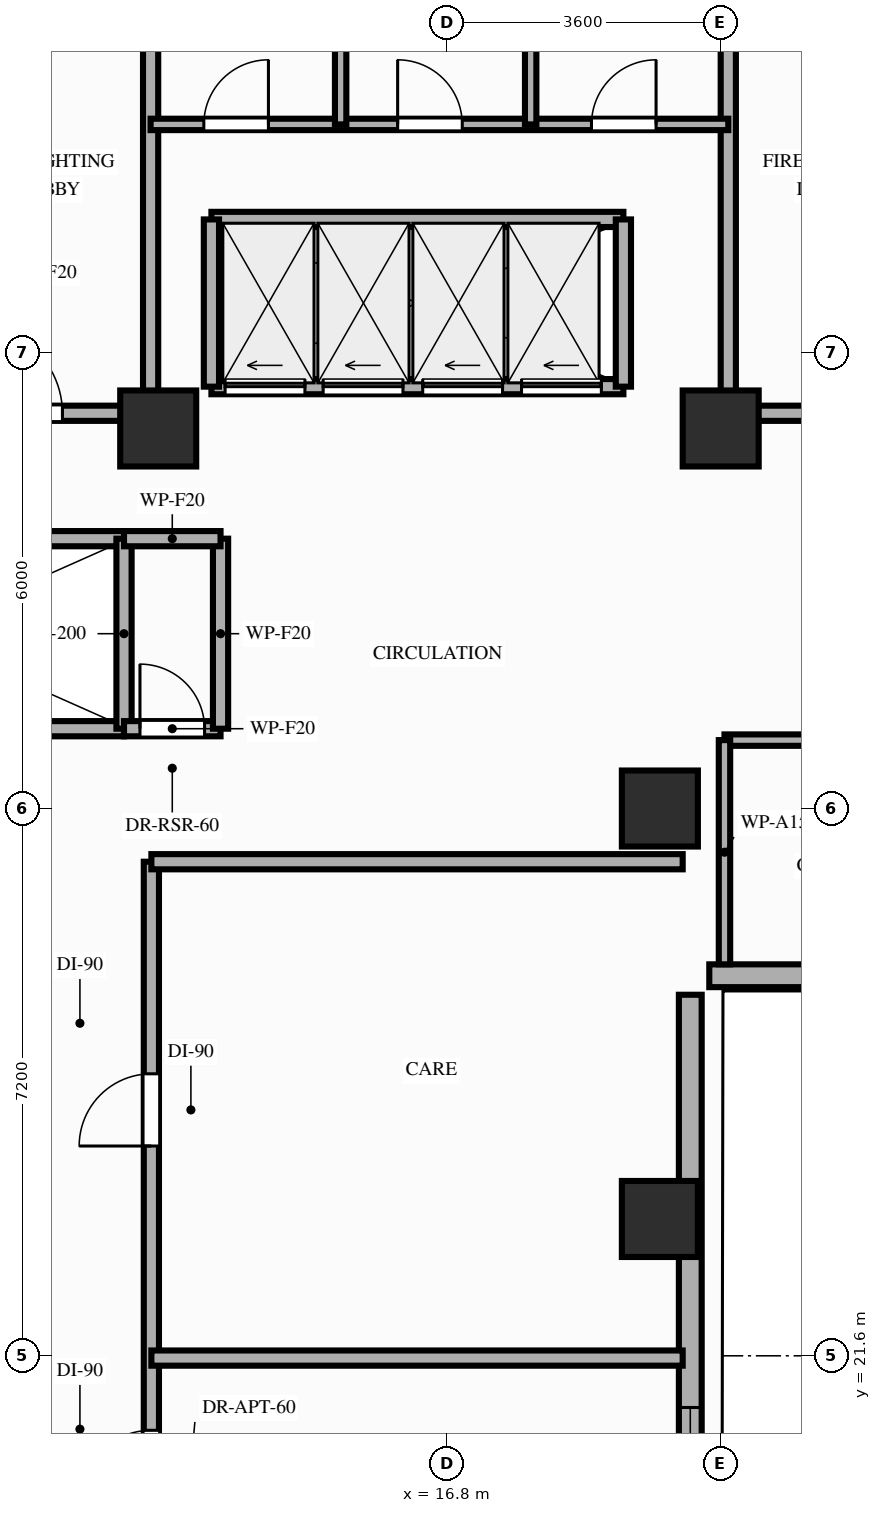
"""IFC4 building model, lengths in metres.
Left out: names, types, materials, properties, quantities, classifications, styles, units other than length and angle.
Written with IfcOpenShell. Run it as: python <this file> out.ifc"""

import sys

from ifc_helpers import new_model, si_unit, direction, frame, frame_2d, origin, origin_2d, place, context, subcontext, project, spatial, rectangle, extrude, element, fill, save


model = new_model("IFC4")
c1 = context("Model", 3, precision=1e-05, world=origin(), true_north=direction((0.0, 1.0)))
c2 = subcontext(c1, "Body", "Model", "MODEL_VIEW")
j1 = project(units=[si_unit("LENGTHUNIT", "METRE"), si_unit("PLANEANGLEUNIT", "RADIAN")], contexts=[c1])
p1 = place(None, origin())
s1 = spatial("IfcSite", under=j1, at=p1, CompositionType="ELEMENT")
p2 = place(p1, origin())
s2 = spatial("IfcBuilding", under=s1, at=p2, CompositionType="ELEMENT")
p3 = place(p2, frame((0.0, 0.0, 133.0)))
s3 = spatial("IfcBuildingStorey", under=s2, at=p3, CompositionType="ELEMENT", Elevation=133.0)
for number, where, z_axis, x_axis in (
    (1, (13.0, 33.8, 0.0), (0.0, 0.0, 1.0), (1.0, 0.0, 0.0)),
    (2, (20.4, 33.8, 0.0), (0.0, 0.0, 1.0), (1.0, 0.0, 0.0)),
    (3, (19.6, 23.4, 0.0), (0.0, 0.0, 1.0), (1.0, 0.0, 0.0)),
    (4, (19.6, 28.8, 0.0), (0.0, 0.0, 1.0), (1.0, 0.0, 0.0)),
):
    element("IfcColumn", number, at=place(p3, frame(where, z_axis=z_axis, x_axis=x_axis)), inside=s3, PredefinedType="COLUMN", context=c2, shape_type="SweptSolid", body=[
        extrude(rectangle(XDim=1.0, YDim=1.0, at=origin_2d()), origin(), (0.0, 0.0, 1.0), 3.2),
    ])
p4 = place(p3, frame((20.0, 8.8, 0.0), z_axis=(0.0, 0.0, 1.0), x_axis=(0.0, 1.0, 0.0)))
e5 = element("IfcWall", 5, at=p4, inside=s3, PredefinedType="STANDARD", context=c2, shape_type="SweptSolid", body=[
    extrude(rectangle(XDim=17.55, YDim=0.3, at=frame_2d((8.775, 0.0))), origin(), (0.0, 0.0, 1.0), 2.46),
])
p5 = place(p4, frame((10.32, 0.0, 0.85)))
e6 = element("IfcOpeningElement", 6, at=p5, cuts=e5, PredefinedType="OPENING", context=c2, shape_type="SweptSolid", body=[
    extrude(rectangle(XDim=1.8, YDim=1.36, at=frame_2d((0.9, 0.68))), frame((0.0, 0.16, 0.0), z_axis=(0.0, -1.0, 0.0), x_axis=(1.0, 0.0, 0.0)), (0.0, 0.0, 1.0), 0.32),
])
p6 = place(p3, frame((20.25, 26.6, 0.0), z_axis=(0.0, 0.0, 1.0), x_axis=(1.0, 0.0, 0.0)))
e7 = element("IfcWall", 7, at=p6, inside=s3, PredefinedType="STANDARD", context=c2, shape_type="SweptSolid", body=[
    extrude(rectangle(XDim=26.15, YDim=0.3, at=frame_2d((13.075, 0.0))), origin(), (0.0, 0.0, 1.0), 2.71),
])
p7 = place(p6, frame((7.95, 0.0, 0.0)))
e8 = element("IfcOpeningElement", 8, at=p7, cuts=e7, PredefinedType="OPENING", context=c2, shape_type="SweptSolid", body=[
    extrude(rectangle(XDim=1.4, YDim=2.1, at=frame_2d((0.7, 1.05))), frame((0.0, 0.16, 0.0), z_axis=(0.0, -1.0, 0.0), x_axis=(1.0, 0.0, 0.0)), (0.0, 0.0, 1.0), 0.32),
])
p8 = place(p6, frame((22.45, 0.0, 0.0)))
e9 = element("IfcOpeningElement", 9, at=p8, cuts=e7, PredefinedType="OPENING", context=c2, shape_type="SweptSolid", body=[
    extrude(rectangle(XDim=1.4, YDim=2.1, at=frame_2d((0.7, 1.05))), frame((0.0, 0.16, 0.0), z_axis=(0.0, -1.0, 0.0), x_axis=(1.0, 0.0, 0.0)), (0.0, 0.0, 1.0), 0.32),
])
p9 = place(p6, frame((2.65, 0.0, 0.85)))
e10 = element("IfcOpeningElement", 10, at=p9, cuts=e7, PredefinedType="OPENING", context=c2, shape_type="SweptSolid", body=[
    extrude(rectangle(XDim=1.8, YDim=1.61, at=frame_2d((0.9, 0.805))), frame((0.0, 0.16, 0.0), z_axis=(0.0, -1.0, 0.0), x_axis=(1.0, 0.0, 0.0)), (0.0, 0.0, 1.0), 0.32),
])
p10 = place(p6, frame((13.65, 0.0, 0.85)))
e11 = element("IfcOpeningElement", 11, at=p10, cuts=e7, PredefinedType="OPENING", context=c2, shape_type="SweptSolid", body=[
    extrude(rectangle(XDim=1.8, YDim=1.61, at=frame_2d((0.9, 0.805))), frame((0.0, 0.16, 0.0), z_axis=(0.0, -1.0, 0.0), x_axis=(1.0, 0.0, 0.0)), (0.0, 0.0, 1.0), 0.32),
])
for number, where, z_axis, x_axis in (
    (12, (7.0, 29.85, 0.0), (0.0, 0.0, 1.0), (1.0, 0.0, 0.0)),
    (13, (7.0, 32.35, 0.0), (0.0, 0.0, 1.0), (1.0, 0.0, 0.0)),
):
    element("IfcWall", number, at=place(p3, frame(where, z_axis=z_axis, x_axis=x_axis)), inside=s3, PredefinedType="MOVABLE", context=c2, shape_type="SweptSolid", body=[
        extrude(rectangle(XDim=5.55, YDim=0.2, at=frame_2d((2.775, 0.0))), origin(), (0.0, 0.0, 1.0), 3.02),
    ])
p11 = place(p3, frame((12.55, 29.85, 0.0), z_axis=(0.0, 0.0, 1.0), x_axis=(0.0, 1.0, 0.0)))
e14 = element("IfcWall", 14, at=p11, inside=s3, PredefinedType="MOVABLE", context=c2, shape_type="SweptSolid", body=[
    extrude(rectangle(XDim=2.5, YDim=0.2, at=frame_2d((1.25, 0.0))), origin(), (0.0, 0.0, 1.0), 3.02),
])
p12 = place(p3, frame((12.9, 34.0, 0.0), z_axis=(0.0, 0.0, 1.0), x_axis=(0.0, 1.0, 0.0)))
e15 = element("IfcWall", 15, at=p12, inside=s3, PredefinedType="PARTITIONING", context=c2, shape_type="SweptSolid", body=[
    extrude(rectangle(XDim=5.45, YDim=0.2, at=frame_2d((2.725, 0.0))), origin(), (0.0, 0.0, 1.0), 2.46),
])
p13 = place(p3, frame((10.24, 34.0, 0.0), z_axis=(0.0, 0.0, 1.0), x_axis=(1.0, 0.0, 0.0)))
e16 = element("IfcWall", 16, at=p13, inside=s3, PredefinedType="PARTITIONING", context=c2, shape_type="SweptSolid", body=[
    extrude(rectangle(XDim=2.66, YDim=0.2, at=frame_2d((1.33, 0.0))), origin(), (0.0, 0.0, 1.0), 2.46),
])
p14 = place(p13, frame((0.35, 0.0, 0.0)))
e17 = element("IfcOpeningElement", 17, at=p14, cuts=e16, PredefinedType="OPENING", context=c2, shape_type="SweptSolid", body=[
    extrude(rectangle(XDim=1.15, YDim=2.15, at=frame_2d((0.575, 1.075))), frame((0.0, 0.11, 0.0), z_axis=(0.0, -1.0, 0.0), x_axis=(1.0, 0.0, 0.0)), (0.0, 0.0, 1.0), 0.22),
])
p15 = place(p3, frame((20.5, 34.0, 0.0), z_axis=(0.0, 0.0, 1.0), x_axis=(0.0, 1.0, 0.0)))
e18 = element("IfcWall", 18, at=p15, inside=s3, PredefinedType="PARTITIONING", context=c2, shape_type="SweptSolid", body=[
    extrude(rectangle(XDim=5.45, YDim=0.2, at=frame_2d((2.725, 0.0))), origin(), (0.0, 0.0, 1.0), 2.46),
])
p16 = place(p3, frame((20.5, 34.0, 0.0), z_axis=(0.0, 0.0, 1.0), x_axis=(1.0, 0.0, 0.0)))
e19 = element("IfcWall", 19, at=p16, inside=s3, PredefinedType="PARTITIONING", context=c2, shape_type="SweptSolid", body=[
    extrude(rectangle(XDim=2.6, YDim=0.2, at=frame_2d((1.3, 0.0))), origin(), (0.0, 0.0, 1.0), 2.46),
])
p17 = place(p16, frame((1.05, 0.0, 0.0)))
e20 = element("IfcOpeningElement", 20, at=p17, cuts=e19, PredefinedType="OPENING", context=c2, shape_type="SweptSolid", body=[
    extrude(rectangle(XDim=1.15, YDim=2.15, at=frame_2d((0.575, 1.075))), frame((0.0, 0.11, 0.0), z_axis=(0.0, -1.0, 0.0), x_axis=(1.0, 0.0, 0.0)), (0.0, 0.0, 1.0), 0.22),
])
p18 = place(p3, frame((12.55, 29.85, 0.0), z_axis=(0.0, 0.0, 1.0), x_axis=(1.0, 0.0, 0.0)))
e21 = element("IfcWall", 21, at=p18, inside=s3, PredefinedType="PARTITIONING", context=c2, shape_type="SweptSolid", body=[
    extrude(rectangle(XDim=1.27, YDim=0.2, at=frame_2d((0.635, 0.0))), origin(), (0.0, 0.0, 1.0), 3.02),
])
p19 = place(p18, frame((0.21, 0.0, 0.0)))
e22 = element("IfcOpeningElement", 22, at=p19, cuts=e21, PredefinedType="OPENING", context=c2, shape_type="SweptSolid", body=[
    extrude(rectangle(XDim=0.85, YDim=2.05, at=frame_2d((0.425, 1.025))), frame((0.0, 0.11, 0.0), z_axis=(0.0, -1.0, 0.0), x_axis=(1.0, 0.0, 0.0)), (0.0, 0.0, 1.0), 0.22),
])
p20 = place(p3, frame((13.82, 29.85, 0.0), z_axis=(0.0, 0.0, 1.0), x_axis=(0.0, 1.0, 0.0)))
e23 = element("IfcWall", 23, at=p20, inside=s3, PredefinedType="PARTITIONING", context=c2, shape_type="SweptSolid", body=[
    extrude(rectangle(XDim=2.5, YDim=0.2, at=frame_2d((1.25, 0.0))), origin(), (0.0, 0.0, 1.0), 3.02),
])
p21 = place(p3, frame((12.55, 32.35, 0.0), z_axis=(0.0, 0.0, 1.0), x_axis=(1.0, 0.0, 0.0)))
e24 = element("IfcWall", 24, at=p21, inside=s3, PredefinedType="PARTITIONING", context=c2, shape_type="SweptSolid", body=[
    extrude(rectangle(XDim=1.27, YDim=0.2, at=frame_2d((0.635, 0.0))), origin(), (0.0, 0.0, 1.0), 3.02),
])
p22 = place(p3, frame((12.9, 37.8, 0.0), z_axis=(0.0, 0.0, 1.0), x_axis=(1.0, 0.0, 0.0)))
e25 = element("IfcWall", 25, at=p22, inside=s3, PredefinedType="PARTITIONING", context=c2, shape_type="SweptSolid", body=[
    extrude(rectangle(XDim=7.6, YDim=0.15, at=frame_2d((3.8, 0.0))), origin(), (0.0, 0.0, 1.0), 3.02),
])
p23 = place(p22, frame((0.7, 0.0, 0.0)))
e26 = element("IfcOpeningElement", 26, at=p23, cuts=e25, PredefinedType="OPENING", context=c2, shape_type="SweptSolid", body=[
    extrude(rectangle(XDim=0.85, YDim=2.05, at=frame_2d((0.425, 1.025))), frame((0.0, 0.085, 0.0), z_axis=(0.0, -1.0, 0.0), x_axis=(1.0, 0.0, 0.0)), (0.0, 0.0, 1.0), 0.17),
])
p24 = place(p22, frame((3.25, 0.0, 0.0)))
e27 = element("IfcOpeningElement", 27, at=p24, cuts=e25, PredefinedType="OPENING", context=c2, shape_type="SweptSolid", body=[
    extrude(rectangle(XDim=0.85, YDim=2.05, at=frame_2d((0.425, 1.025))), frame((0.0, 0.085, 0.0), z_axis=(0.0, -1.0, 0.0), x_axis=(1.0, 0.0, 0.0)), (0.0, 0.0, 1.0), 0.17),
])
p25 = place(p22, frame((5.8, 0.0, 0.0)))
e28 = element("IfcOpeningElement", 28, at=p25, cuts=e25, PredefinedType="OPENING", context=c2, shape_type="SweptSolid", body=[
    extrude(rectangle(XDim=0.85, YDim=2.05, at=frame_2d((0.425, 1.025))), frame((0.0, 0.085, 0.0), z_axis=(0.0, -1.0, 0.0), x_axis=(1.0, 0.0, 0.0)), (0.0, 0.0, 1.0), 0.17),
])
for number, where, z_axis, x_axis in (
    (29, (15.4, 37.8, 0.0), (0.0, 0.0, 1.0), (0.0, 1.0, 0.0)),
    (30, (17.9, 37.8, 0.0), (0.0, 0.0, 1.0), (0.0, 1.0, 0.0)),
):
    element("IfcWall", number, at=place(p3, frame(where, z_axis=z_axis, x_axis=x_axis)), inside=s3, PredefinedType="PARTITIONING", context=c2, shape_type="SweptSolid", body=[
        extrude(rectangle(XDim=4.4, YDim=0.15, at=frame_2d((2.2, 0.0))), origin(), (0.0, 0.0, 1.0), 2.46),
    ])
p26 = place(p3, frame((13.7, 34.35, 0.0), z_axis=(0.0, 0.0, 1.0), x_axis=(1.0, 0.0, 0.0)))
e31 = element("IfcWall", 31, at=p26, inside=s3, PredefinedType="MOVABLE", context=c2, shape_type="SweptSolid", body=[
    extrude(rectangle(XDim=5.42, YDim=0.2, at=frame_2d((2.71, 0.0))), origin(), (0.0, 0.0, 1.0), 3.02),
])
p27 = place(p26, frame((0.18, 0.0, 0.0)))
e32 = element("IfcOpeningElement", 32, at=p27, cuts=e31, PredefinedType="OPENING", context=c2, shape_type="SweptSolid", body=[
    extrude(rectangle(XDim=1.05, YDim=2.15, at=frame_2d((0.525, 1.075))), frame((0.0, 0.11, 0.0), z_axis=(0.0, -1.0, 0.0), x_axis=(1.0, 0.0, 0.0)), (0.0, 0.0, 1.0), 0.22),
])
p28 = place(p26, frame((1.47, 0.0, 0.0)))
e33 = element("IfcOpeningElement", 33, at=p28, cuts=e31, PredefinedType="OPENING", context=c2, shape_type="SweptSolid", body=[
    extrude(rectangle(XDim=1.05, YDim=2.15, at=frame_2d((0.525, 1.075))), frame((0.0, 0.11, 0.0), z_axis=(0.0, -1.0, 0.0), x_axis=(1.0, 0.0, 0.0)), (0.0, 0.0, 1.0), 0.22),
])
p29 = place(p26, frame((2.78, 0.0, 0.0)))
e34 = element("IfcOpeningElement", 34, at=p29, cuts=e31, PredefinedType="OPENING", context=c2, shape_type="SweptSolid", body=[
    extrude(rectangle(XDim=1.05, YDim=2.15, at=frame_2d((0.525, 1.075))), frame((0.0, 0.11, 0.0), z_axis=(0.0, -1.0, 0.0), x_axis=(1.0, 0.0, 0.0)), (0.0, 0.0, 1.0), 0.22),
])
p30 = place(p26, frame((4.08, 0.0, 0.0)))
e35 = element("IfcOpeningElement", 35, at=p30, cuts=e31, PredefinedType="OPENING", context=c2, shape_type="SweptSolid", body=[
    extrude(rectangle(XDim=1.05, YDim=2.15, at=frame_2d((0.525, 1.075))), frame((0.0, 0.11, 0.0), z_axis=(0.0, -1.0, 0.0), x_axis=(1.0, 0.0, 0.0)), (0.0, 0.0, 1.0), 0.22),
])
p31 = place(p3, frame((13.7, 36.55, 0.0), z_axis=(0.0, 0.0, 1.0), x_axis=(1.0, 0.0, 0.0)))
e36 = element("IfcWall", 36, at=p31, inside=s3, PredefinedType="MOVABLE", context=c2, shape_type="SweptSolid", body=[
    extrude(rectangle(XDim=5.42, YDim=0.2, at=frame_2d((2.71, 0.0))), origin(), (0.0, 0.0, 1.0), 3.02),
])
for number, where, z_axis, x_axis in (
    (37, (13.7, 34.35, 0.0), (0.0, 0.0, 1.0), (0.0, 1.0, 0.0)),
    (38, (19.12, 34.35, 0.0), (0.0, 0.0, 1.0), (0.0, 1.0, 0.0)),
):
    element("IfcWall", number, at=place(p3, frame(where, z_axis=z_axis, x_axis=x_axis)), inside=s3, PredefinedType="MOVABLE", context=c2, shape_type="SweptSolid", body=[
        extrude(rectangle(XDim=2.2, YDim=0.2, at=frame_2d((1.1, 0.0))), origin(), (0.0, 0.0, 1.0), 3.02),
    ])
p32 = place(p3, frame((12.91, 12.4, 0.0), z_axis=(0.0, 0.0, 1.0), x_axis=(0.0, 1.0, 0.0)))
e39 = element("IfcWall", 39, at=p32, inside=s3, PredefinedType="PARTITIONING", context=c2, shape_type="SweptSolid", body=[
    extrude(rectangle(XDim=15.7, YDim=0.2, at=frame_2d((7.85, 0.0))), origin(), (0.0, 0.0, 1.0), 2.46),
])
p33 = place(p32, frame((0.45, 0.0, 0.0)))
e40 = element("IfcOpeningElement", 40, at=p33, cuts=e39, PredefinedType="OPENING", context=c2, shape_type="SweptSolid", body=[
    extrude(rectangle(XDim=0.95, YDim=2.15, at=frame_2d((0.475, 1.075))), frame((0.0, 0.11, 0.0), z_axis=(0.0, -1.0, 0.0), x_axis=(1.0, 0.0, 0.0)), (0.0, 0.0, 1.0), 0.22),
])
p34 = place(p32, frame((2.75, 0.0, 0.0)))
e41 = element("IfcOpeningElement", 41, at=p34, cuts=e39, PredefinedType="OPENING", context=c2, shape_type="SweptSolid", body=[
    extrude(rectangle(XDim=0.95, YDim=2.1, at=frame_2d((0.475, 1.05))), frame((0.0, 0.11, 0.0), z_axis=(0.0, -1.0, 0.0), x_axis=(1.0, 0.0, 0.0)), (0.0, 0.0, 1.0), 0.22),
])
p35 = place(p32, frame((11.96, 0.0, 0.0)))
e42 = element("IfcOpeningElement", 42, at=p35, cuts=e39, PredefinedType="OPENING", context=c2, shape_type="SweptSolid", body=[
    extrude(rectangle(XDim=0.95, YDim=2.15, at=frame_2d((0.475, 1.075))), frame((0.0, 0.11, 0.0), z_axis=(0.0, -1.0, 0.0), x_axis=(1.0, 0.0, 0.0)), (0.0, 0.0, 1.0), 0.22),
])
p36 = place(p32, frame((7.27, 0.0, 0.0)))
e43 = element("IfcOpeningElement", 43, at=p36, cuts=e39, PredefinedType="OPENING", context=c2, shape_type="SweptSolid", body=[
    extrude(rectangle(XDim=0.95, YDim=2.15, at=frame_2d((0.475, 1.075))), frame((0.0, 0.11, 0.0), z_axis=(0.0, -1.0, 0.0), x_axis=(1.0, 0.0, 0.0)), (0.0, 0.0, 1.0), 0.22),
])
p37 = place(p3, frame((12.91, 28.1, 0.0), z_axis=(0.0, 0.0, 1.0), x_axis=(1.0, 0.0, 0.0)))
e44 = element("IfcWall", 44, at=p37, inside=s3, PredefinedType="PARTITIONING", context=c2, shape_type="SweptSolid", body=[
    extrude(rectangle(XDim=6.99, YDim=0.2, at=frame_2d((3.495, 0.0))), origin(), (0.0, 0.0, 1.0), 2.46),
])
p38 = place(p3, frame((20.45, 29.7, 0.0), z_axis=(0.0, 0.0, 1.0), x_axis=(1.0, 0.0, 0.0)))
e45 = element("IfcWall", 45, at=p38, inside=s3, PredefinedType="PARTITIONING", context=c2, shape_type="SweptSolid", body=[
    extrude(rectangle(XDim=6.7, YDim=0.15, at=frame_2d((3.35, 0.0))), origin(), (0.0, 0.0, 1.0), 3.02),
])
p39 = place(p38, frame((2.8, 0.0, 0.0)))
e46 = element("IfcOpeningElement", 46, at=p39, cuts=e45, PredefinedType="OPENING", context=c2, shape_type="SweptSolid", body=[
    extrude(rectangle(XDim=0.95, YDim=2.15, at=frame_2d((0.475, 1.075))), frame((0.0, 0.085, 0.0), z_axis=(0.0, -1.0, 0.0), x_axis=(1.0, 0.0, 0.0)), (0.0, 0.0, 1.0), 0.17),
])
p40 = place(p3, frame((20.45, 26.75, 0.0), z_axis=(0.0, 0.0, 1.0), x_axis=(0.0, 1.0, 0.0)))
e47 = element("IfcWall", 47, at=p40, inside=s3, PredefinedType="PARTITIONING", context=c2, shape_type="SweptSolid", body=[
    extrude(rectangle(XDim=2.95, YDim=0.15, at=frame_2d((1.475, 0.0))), origin(), (0.0, 0.0, 1.0), 2.46),
])
p41 = place(p3, frame((12.91, 21.57, 0.0), z_axis=(0.0, 0.0, 1.0), x_axis=(1.0, 0.0, 0.0)))
e48 = element("IfcWall", 48, at=p41, inside=s3, PredefinedType="PARTITIONING", context=c2, shape_type="SweptSolid", body=[
    extrude(rectangle(XDim=6.99, YDim=0.2, at=frame_2d((3.495, 0.0))), origin(), (0.0, 0.0, 1.0), 2.46),
])
p42 = place(p5, origin())
e49 = element("IfcWindow", 49, at=p42, inside=s3, PartitioningType="SINGLE_PANEL", PredefinedType="WINDOW", context=c2, shape_type="SweptSolid", body=[
    extrude(rectangle(XDim=1.8, YDim=1.36, at=frame_2d((0.9, 0.68))), frame((0.0, 0.03, 0.0), z_axis=(0.0, -1.0, 0.0), x_axis=(1.0, 0.0, 0.0)), (0.0, 0.0, 1.0), 0.06),
])
fill(e6, e49)
p43 = place(p14, origin())
e50 = element("IfcDoor", 50, at=p43, inside=s3, OperationType="SINGLE_SWING_LEFT", PredefinedType="DOOR", context=c2, shape_type="SweptSolid", body=[
    extrude(rectangle(XDim=1.15, YDim=2.15, at=frame_2d((0.575, 1.075))), frame((0.0, 0.025, 0.0), z_axis=(0.0, -1.0, 0.0), x_axis=(1.0, 0.0, 0.0)), (0.0, 0.0, 1.0), 0.05),
])
fill(e17, e50)
p44 = place(p19, origin())
e51 = element("IfcDoor", 51, at=p44, inside=s3, OperationType="SINGLE_SWING_LEFT", PredefinedType="DOOR", context=c2, shape_type="SweptSolid", body=[
    extrude(rectangle(XDim=0.85, YDim=2.05, at=frame_2d((0.425, 1.025))), frame((0.0, 0.025, 0.0), z_axis=(0.0, -1.0, 0.0), x_axis=(1.0, 0.0, 0.0)), (0.0, 0.0, 1.0), 0.05),
])
fill(e22, e51)
p45 = place(p23, origin())
e52 = element("IfcDoor", 52, at=p45, inside=s3, OperationType="SINGLE_SWING_RIGHT", PredefinedType="DOOR", context=c2, shape_type="SweptSolid", body=[
    extrude(rectangle(XDim=0.85, YDim=2.05, at=frame_2d((0.425, 1.025))), frame((0.0, 0.025, 0.0), z_axis=(0.0, -1.0, 0.0), x_axis=(1.0, 0.0, 0.0)), (0.0, 0.0, 1.0), 0.05),
])
fill(e26, e52)
p46 = place(p24, origin())
e53 = element("IfcDoor", 53, at=p46, inside=s3, OperationType="SINGLE_SWING_LEFT", PredefinedType="DOOR", context=c2, shape_type="SweptSolid", body=[
    extrude(rectangle(XDim=0.85, YDim=2.05, at=frame_2d((0.425, 1.025))), frame((0.0, 0.025, 0.0), z_axis=(0.0, -1.0, 0.0), x_axis=(1.0, 0.0, 0.0)), (0.0, 0.0, 1.0), 0.05),
])
fill(e27, e53)
p47 = place(p25, origin())
e54 = element("IfcDoor", 54, at=p47, inside=s3, OperationType="SINGLE_SWING_RIGHT", PredefinedType="DOOR", context=c2, shape_type="SweptSolid", body=[
    extrude(rectangle(XDim=0.85, YDim=2.05, at=frame_2d((0.425, 1.025))), frame((0.0, 0.025, 0.0), z_axis=(0.0, -1.0, 0.0), x_axis=(1.0, 0.0, 0.0)), (0.0, 0.0, 1.0), 0.05),
])
fill(e28, e54)
p48 = place(p27, origin())
e55 = element("IfcDoor", 55, at=p48, inside=s3, OperationType="SLIDING_TO_LEFT", PredefinedType="DOOR", context=c2, shape_type="SweptSolid", body=[
    extrude(rectangle(XDim=1.05, YDim=2.15, at=frame_2d((0.525, 1.075))), frame((0.0, 0.025, 0.0), z_axis=(0.0, -1.0, 0.0), x_axis=(1.0, 0.0, 0.0)), (0.0, 0.0, 1.0), 0.05),
])
fill(e32, e55)
p49 = place(p28, origin())
e56 = element("IfcDoor", 56, at=p49, inside=s3, OperationType="SLIDING_TO_LEFT", PredefinedType="DOOR", context=c2, shape_type="SweptSolid", body=[
    extrude(rectangle(XDim=1.05, YDim=2.15, at=frame_2d((0.525, 1.075))), frame((0.0, 0.025, 0.0), z_axis=(0.0, -1.0, 0.0), x_axis=(1.0, 0.0, 0.0)), (0.0, 0.0, 1.0), 0.05),
])
fill(e33, e56)
p50 = place(p29, origin())
e57 = element("IfcDoor", 57, at=p50, inside=s3, OperationType="SLIDING_TO_LEFT", PredefinedType="DOOR", context=c2, shape_type="SweptSolid", body=[
    extrude(rectangle(XDim=1.05, YDim=2.15, at=frame_2d((0.525, 1.075))), frame((0.0, 0.025, 0.0), z_axis=(0.0, -1.0, 0.0), x_axis=(1.0, 0.0, 0.0)), (0.0, 0.0, 1.0), 0.05),
])
fill(e34, e57)
p51 = place(p30, origin())
e58 = element("IfcDoor", 58, at=p51, inside=s3, OperationType="SLIDING_TO_LEFT", PredefinedType="DOOR", context=c2, shape_type="SweptSolid", body=[
    extrude(rectangle(XDim=1.05, YDim=2.15, at=frame_2d((0.525, 1.075))), frame((0.0, 0.025, 0.0), z_axis=(0.0, -1.0, 0.0), x_axis=(1.0, 0.0, 0.0)), (0.0, 0.0, 1.0), 0.05),
])
fill(e35, e58)
p52 = place(p35, origin())
e59 = element("IfcDoor", 59, at=p52, inside=s3, OperationType="SINGLE_SWING_LEFT", PredefinedType="DOOR", context=c2, shape_type="SweptSolid", body=[
    extrude(rectangle(XDim=0.95, YDim=2.15, at=frame_2d((0.475, 1.075))), frame((0.0, 0.025, 0.0), z_axis=(0.0, -1.0, 0.0), x_axis=(1.0, 0.0, 0.0)), (0.0, 0.0, 1.0), 0.05),
])
fill(e42, e59)
p53 = place(p36, origin())
e60 = element("IfcDoor", 60, at=p53, inside=s3, OperationType="SINGLE_SWING_LEFT", PredefinedType="DOOR", context=c2, shape_type="SweptSolid", body=[
    extrude(rectangle(XDim=0.95, YDim=2.15, at=frame_2d((0.475, 1.075))), frame((0.0, 0.025, 0.0), z_axis=(0.0, -1.0, 0.0), x_axis=(1.0, 0.0, 0.0)), (0.0, 0.0, 1.0), 0.05),
])
fill(e43, e60)
save(model, sys.argv[1])
